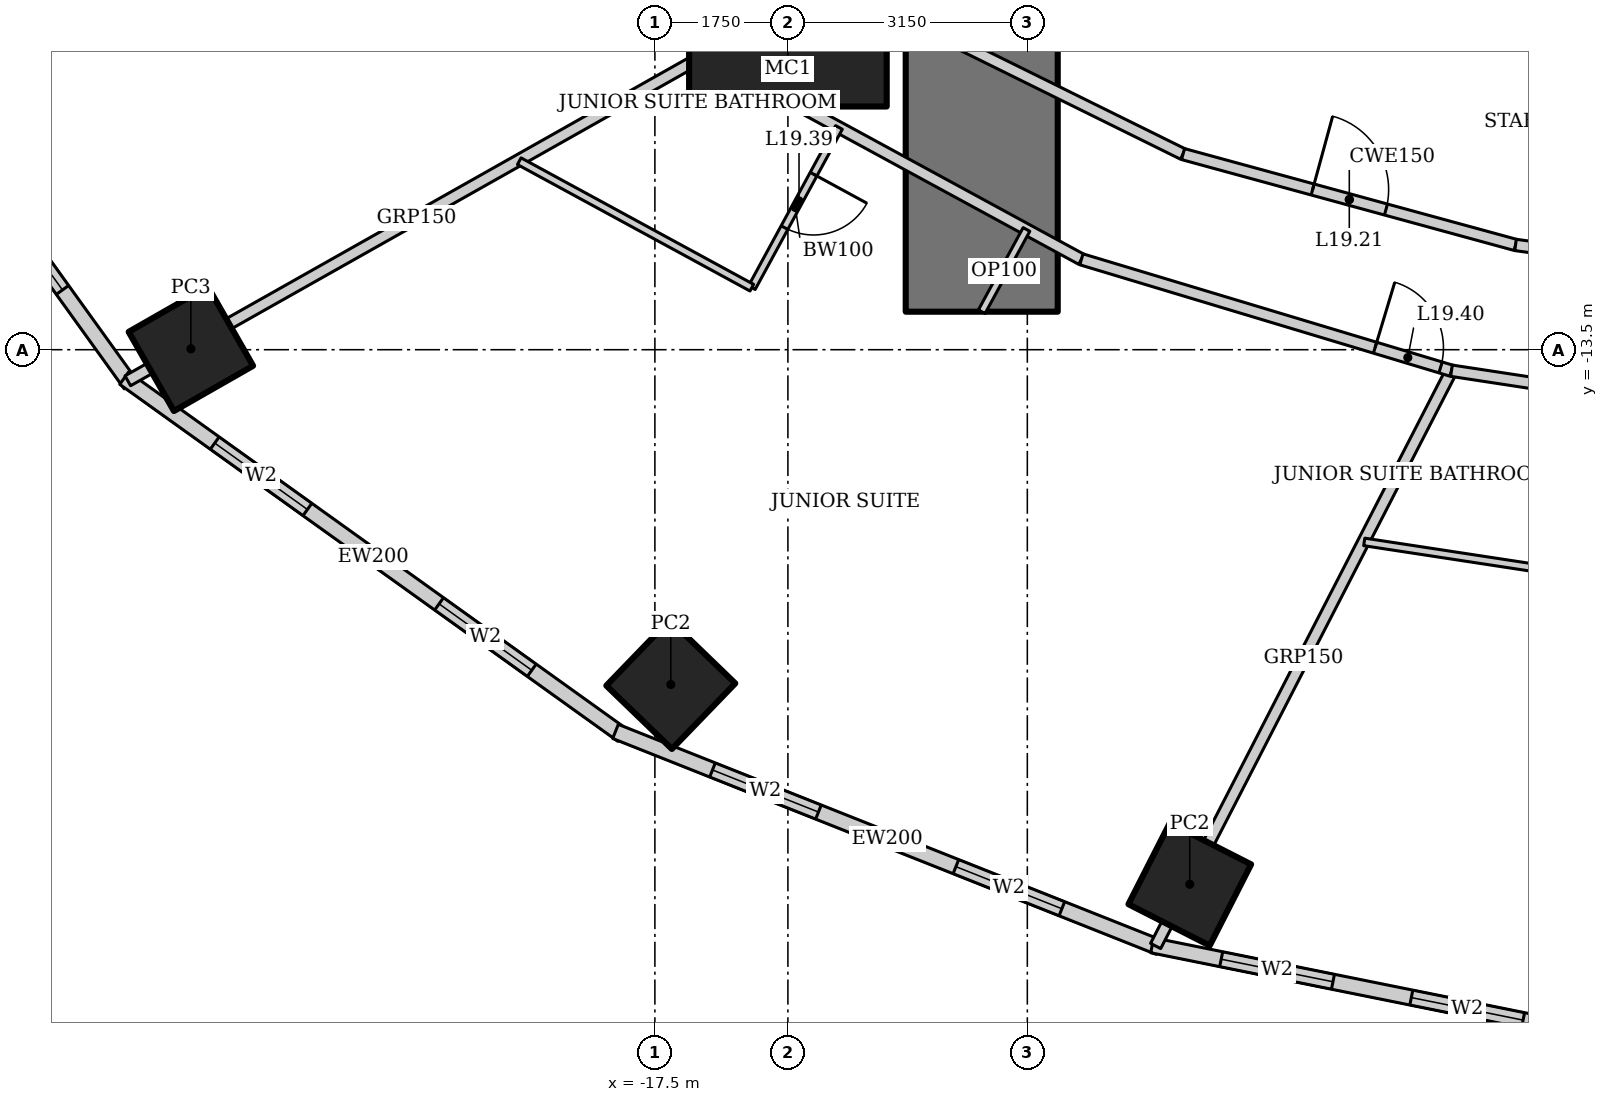
"""IFC4 building model, lengths in metres.
Left out: names, types, materials, properties, quantities, classifications, styles, units other than length and angle.
Written with IfcOpenShell. Run it as: python <this file> out.ifc"""

import sys

from ifc_helpers import new_model, si_unit, direction, frame, frame_2d, origin, origin_2d, place, context, subcontext, project, spatial, rectangle, hollow_rectangle, extrude, element, fill, save


model = new_model("IFC4")
c1 = context("Model", 3, precision=1e-05, world=origin(), true_north=direction((0.0, 1.0)))
c2 = subcontext(c1, "Body", "Model", "MODEL_VIEW")
j1 = project(units=[si_unit("LENGTHUNIT", "METRE"), si_unit("PLANEANGLEUNIT", "RADIAN")], contexts=[c1])
p1 = place(None, origin())
s1 = spatial("IfcSite", under=j1, at=p1, CompositionType="ELEMENT")
p2 = place(p1, origin())
s2 = spatial("IfcBuilding", under=s1, at=p2, CompositionType="ELEMENT")
p3 = place(p2, frame((0.0, 0.0, 83.8)))
s3 = spatial("IfcBuildingStorey", under=s2, at=p3, CompositionType="ELEMENT", Elevation=83.8)
p4 = place(p3, frame((-15.75, -9.0, 0.0), z_axis=(0.0, 0.0, 1.0), x_axis=(1.0, 0.0, 0.0)))
e1 = element("IfcColumn", 1, at=p4, inside=s3, PredefinedType="COLUMN", context=c2, shape_type="SweptSolid", body=[
    extrude(hollow_rectangle(XDim=2.6, YDim=2.6, WallThickness=0.13, at=origin_2d()), origin(), (0.0, 0.0, 1.0), 3.6),
])
p5 = place(p3, frame((-23.605, -13.489, 0.0), z_axis=(0.0, 0.0, 1.0), x_axis=(0.86824298017, 0.496139221777, 0.0)))
e2 = element("IfcColumn", 2, at=p5, inside=s3, PredefinedType="COLUMN", context=c2, shape_type="SweptSolid", body=[
    extrude(hollow_rectangle(XDim=1.2, YDim=1.2, WallThickness=0.12, at=origin_2d()), origin(), (0.0, 0.0, 1.0), 3.6),
])
for number, where, z_axis, x_axis in (
    (3, (-17.291, -17.905, 0.0), (0.0, 0.0, 1.0), (0.695, 0.719, 0.0)),
    (4, (-10.463, -20.534, 0.0), (0.0, 0.0, 1.0), (0.454, 0.891, 0.0)),
):
    element("IfcColumn", number, at=place(p3, frame(where, z_axis=z_axis, x_axis=x_axis)), inside=s3, PredefinedType="COLUMN", context=c2, shape_type="SweptSolid", body=[
        extrude(hollow_rectangle(XDim=1.2, YDim=1.2, WallThickness=0.1, at=origin_2d()), origin(), (0.0, 0.0, 1.0), 3.6),
    ])
p6 = place(p3, frame((-13.2, 13.0, 0.0), z_axis=(0.0, 0.0, 1.0), x_axis=(0.0, -1.0, 0.0)))
e5 = element("IfcWall", 5, at=p6, inside=s3, PredefinedType="SHEAR", context=c2, shape_type="SweptSolid", body=[
    extrude(rectangle(XDim=26.0, YDim=2.0, at=frame_2d((13.0, 0.0))), origin(), (0.0, 0.0, 1.0), 3.6),
])
p7 = place(p6, frame((12.1, 0.0, 0.0)))
e6 = element("IfcOpeningElement", 6, at=p7, cuts=e5, PredefinedType="OPENING", context=c2, shape_type="SweptSolid", body=[
    extrude(rectangle(XDim=1.8, YDim=2.1, at=frame_2d((0.9, 1.05))), frame((0.0, 1.01, 0.0), z_axis=(0.0, -1.0, 0.0), x_axis=(1.0, 0.0, 0.0)), (0.0, 0.0, 1.0), 2.02),
])
p8 = place(p3, frame((-29.26, -7.2, 0.0), z_axis=(0.0, 0.0, 1.0), x_axis=(0.583937613703, -0.811798536155, 0.0)))
e7 = element("IfcWall", 7, at=p8, inside=s3, PredefinedType="SOLIDWALL", context=c2, shape_type="SweptSolid", body=[
    extrude(rectangle(XDim=8.323, YDim=0.2, at=frame_2d((4.162, 0.0))), origin(), (0.0, 0.0, 1.0), 3.45),
])
p9 = place(p8, frame((1.531, 0.0, 0.5)))
e8 = element("IfcOpeningElement", 8, at=p9, cuts=e7, PredefinedType="OPENING", context=c2, shape_type="SweptSolid", body=[
    extrude(rectangle(XDim=1.5, YDim=2.2, at=frame_2d((0.75, 1.1))), frame((0.0, 0.11, 0.0), z_axis=(0.0, -1.0, 0.0), x_axis=(1.0, 0.0, 0.0)), (0.0, 0.0, 1.0), 0.22),
])
p10 = place(p8, frame((5.292, 0.0, 0.5)))
e9 = element("IfcOpeningElement", 9, at=p10, cuts=e7, PredefinedType="OPENING", context=c2, shape_type="SweptSolid", body=[
    extrude(rectangle(XDim=1.5, YDim=2.2, at=frame_2d((0.75, 1.1))), frame((0.0, 0.11, 0.0), z_axis=(0.0, -1.0, 0.0), x_axis=(1.0, 0.0, 0.0)), (0.0, 0.0, 1.0), 0.22),
])
p11 = place(p3, frame((-24.482, -13.875, 0.0), z_axis=(0.0, 0.0, 1.0), x_axis=(0.812791321576, -0.582554948112, 0.0)))
e10 = element("IfcWall", 10, at=p11, inside=s3, PredefinedType="SOLIDWALL", context=c2, shape_type="SweptSolid", body=[
    extrude(rectangle(XDim=8.063, YDim=0.2, at=frame_2d((4.032, 0.0))), origin(), (0.0, 0.0, 1.0), 3.45),
])
p12 = place(p11, frame((1.466, 0.0, 0.5)))
e11 = element("IfcOpeningElement", 11, at=p12, cuts=e10, PredefinedType="OPENING", context=c2, shape_type="SweptSolid", body=[
    extrude(rectangle(XDim=1.5, YDim=2.2, at=frame_2d((0.75, 1.1))), frame((0.0, 0.11, 0.0), z_axis=(0.0, -1.0, 0.0), x_axis=(1.0, 0.0, 0.0)), (0.0, 0.0, 1.0), 0.22),
])
p13 = place(p11, frame((5.097, 0.0, 0.5)))
e12 = element("IfcOpeningElement", 12, at=p13, cuts=e10, PredefinedType="OPENING", context=c2, shape_type="SweptSolid", body=[
    extrude(rectangle(XDim=1.5, YDim=2.2, at=frame_2d((0.75, 1.1))), frame((0.0, 0.11, 0.0), z_axis=(0.0, -1.0, 0.0), x_axis=(1.0, 0.0, 0.0)), (0.0, 0.0, 1.0), 0.22),
])
p14 = place(p3, frame((-18.018, -18.523, 0.0), z_axis=(0.0, 0.0, 1.0), x_axis=(0.929358351251, -0.369178892895, 0.0)))
e13 = element("IfcWall", 13, at=p14, inside=s3, PredefinedType="SOLIDWALL", context=c2, shape_type="SweptSolid", body=[
    extrude(rectangle(XDim=7.692, YDim=0.2, at=frame_2d((3.846, 0.0))), origin(), (0.0, 0.0, 1.0), 3.45),
])
p15 = place(p14, frame((1.373, 0.0, 0.5)))
e14 = element("IfcOpeningElement", 14, at=p15, cuts=e13, PredefinedType="OPENING", context=c2, shape_type="SweptSolid", body=[
    extrude(rectangle(XDim=1.5, YDim=2.2, at=frame_2d((0.75, 1.1))), frame((0.0, 0.11, 0.0), z_axis=(0.0, -1.0, 0.0), x_axis=(1.0, 0.0, 0.0)), (0.0, 0.0, 1.0), 0.22),
])
p16 = place(p14, frame((4.819, 0.0, 0.5)))
e15 = element("IfcOpeningElement", 15, at=p16, cuts=e13, PredefinedType="OPENING", context=c2, shape_type="SweptSolid", body=[
    extrude(rectangle(XDim=1.5, YDim=2.2, at=frame_2d((0.75, 1.1))), frame((0.0, 0.11, 0.0), z_axis=(0.0, -1.0, 0.0), x_axis=(1.0, 0.0, 0.0)), (0.0, 0.0, 1.0), 0.22),
])
p17 = place(p3, frame((-10.957, -21.337, 0.0), z_axis=(0.0, 0.0, 1.0), x_axis=(0.980251657452, -0.197754110105, 0.0)))
e16 = element("IfcWall", 16, at=p17, inside=s3, PredefinedType="SOLIDWALL", context=c2, shape_type="SweptSolid", body=[
    extrude(rectangle(XDim=5.904, YDim=0.2, at=frame_2d((2.952, 0.0))), origin(), (0.0, 0.0, 1.0), 3.45),
])
p18 = place(p17, frame((0.926, 0.0, 0.5)))
e17 = element("IfcOpeningElement", 17, at=p18, cuts=e16, PredefinedType="OPENING", context=c2, shape_type="SweptSolid", body=[
    extrude(rectangle(XDim=1.5, YDim=2.2, at=frame_2d((0.75, 1.1))), frame((0.0, 0.11, 0.0), z_axis=(0.0, -1.0, 0.0), x_axis=(1.0, 0.0, 0.0)), (0.0, 0.0, 1.0), 0.22),
])
p19 = place(p17, frame((3.478, 0.0, 0.5)))
e18 = element("IfcOpeningElement", 18, at=p19, cuts=e16, PredefinedType="OPENING", context=c2, shape_type="SweptSolid", body=[
    extrude(rectangle(XDim=1.5, YDim=2.2, at=frame_2d((0.75, 1.1))), frame((0.0, 0.11, 0.0), z_axis=(0.0, -1.0, 0.0), x_axis=(1.0, 0.0, 0.0)), (0.0, 0.0, 1.0), 0.22),
])
p20 = place(p3, frame((-24.435, -13.909, 0.0), z_axis=(0.0, 0.0, 1.0), x_axis=(0.87090601027, 0.491449612143, 0.0)))
e19 = element("IfcWall", 19, at=p20, inside=s3, PredefinedType="PARTITIONING", context=c2, shape_type="SweptSolid", body=[
    extrude(rectangle(XDim=8.726, YDim=0.15, at=frame_2d((4.363, 0.0))), origin(), (0.0, 0.0, 1.0), 2.693),
])
p21 = place(p3, frame((-10.912, -21.346, 0.0), z_axis=(0.0, 0.0, 1.0), x_axis=(0.457327273085, 0.889298468059, 0.0)))
e20 = element("IfcWall", 20, at=p21, inside=s3, PredefinedType="PARTITIONING", context=c2, shape_type="SweptSolid", body=[
    extrude(rectangle(XDim=8.511, YDim=0.15, at=frame_2d((4.256, 0.0))), origin(), (0.0, 0.0, 1.0), 2.528),
])
p22 = place(p3, frame((-20.984, -5.232, 0.0), z_axis=(0.0, 0.0, 1.0), x_axis=(0.687062608696, -0.726598218916, 0.0)))
e21 = element("IfcWall", 21, at=p22, inside=s3, PredefinedType="PARTITIONING", context=c2, shape_type="SweptSolid", body=[
    extrude(rectangle(XDim=6.039, YDim=0.15, at=frame_2d((3.02, 0.0))), origin(), (0.0, 0.0, 1.0), 3.45),
])
p23 = place(p22, frame((0.15, 0.0, 0.0)))
e22 = element("IfcOpeningElement", 22, at=p23, cuts=e21, PredefinedType="OPENING", context=c2, shape_type="SweptSolid", body=[
    extrude(rectangle(XDim=0.9, YDim=2.1, at=frame_2d((0.45, 1.05))), frame((0.0, 0.085, 0.0), z_axis=(0.0, -1.0, 0.0), x_axis=(1.0, 0.0, 0.0)), (0.0, 0.0, 1.0), 0.17),
])
p24 = place(p3, frame((-16.835, -9.62, 0.0), z_axis=(0.0, 0.0, 1.0), x_axis=(0.878450059298, -0.477834169267, 0.0)))
e23 = element("IfcWall", 23, at=p24, inside=s3, PredefinedType="PARTITIONING", context=c2, shape_type="SweptSolid", body=[
    extrude(rectangle(XDim=5.631, YDim=0.15, at=frame_2d((2.815, 0.0))), origin(), (0.0, 0.0, 1.0), 3.45),
])
p25 = place(p3, frame((-11.888, -12.311, 0.0), z_axis=(0.0, 0.0, 1.0), x_axis=(0.957564241242, -0.288219922793, 0.0)))
e24 = element("IfcWall", 24, at=p25, inside=s3, PredefinedType="PARTITIONING", context=c2, shape_type="SweptSolid", body=[
    extrude(rectangle(XDim=5.085, YDim=0.15, at=frame_2d((2.542, 0.0))), origin(), (0.0, 0.0, 1.0), 3.45),
])
p26 = place(p25, frame((4.035, 0.0, 0.0)))
e25 = element("IfcOpeningElement", 25, at=p26, cuts=e24, PredefinedType="OPENING", context=c2, shape_type="SweptSolid", body=[
    extrude(rectangle(XDim=0.9, YDim=2.1, at=frame_2d((0.45, 1.05))), frame((0.0, 0.085, 0.0), z_axis=(0.0, -1.0, 0.0), x_axis=(1.0, 0.0, 0.0)), (0.0, 0.0, 1.0), 0.17),
])
p27 = place(p3, frame((-7.019, -13.776, 0.0), z_axis=(0.0, 0.0, 1.0), x_axis=(0.988564270062, -0.150800145746, 0.0)))
e26 = element("IfcWall", 26, at=p27, inside=s3, PredefinedType="PARTITIONING", context=c2, shape_type="SweptSolid", body=[
    extrude(rectangle(XDim=3.751, YDim=0.15, at=frame_2d((1.875, 0.0))), origin(), (0.0, 0.0, 1.0), 3.45),
])
p28 = place(p3, frame((-15.147, -8.656, 0.0), z_axis=(0.0, 0.0, 1.0), x_axis=(0.89656943448, -0.442903205177, 0.0)))
e27 = element("IfcWall", 27, at=p28, inside=s3, PredefinedType="PARTITIONING", context=c2, shape_type="SweptSolid", body=[
    extrude(rectangle(XDim=5.126, YDim=0.15, at=frame_2d((2.563, 0.0))), origin(), (0.0, 0.0, 1.0), 3.45),
])
p29 = place(p3, frame((-10.551, -10.926, 0.0), z_axis=(0.0, 0.0, 1.0), x_axis=(0.964644466646, -0.263554648923, 0.0)))
e28 = element("IfcWall", 28, at=p29, inside=s3, PredefinedType="PARTITIONING", context=c2, shape_type="SweptSolid", body=[
    extrude(rectangle(XDim=4.535, YDim=0.15, at=frame_2d((2.268, 0.0))), origin(), (0.0, 0.0, 1.0), 3.45),
])
p30 = place(p29, frame((1.768, 0.0, 0.0)))
e29 = element("IfcOpeningElement", 29, at=p30, cuts=e28, PredefinedType="OPENING", context=c2, shape_type="SweptSolid", body=[
    extrude(rectangle(XDim=1.0, YDim=2.1, at=frame_2d((0.5, 1.05))), frame((0.0, 0.085, 0.0), z_axis=(0.0, -1.0, 0.0), x_axis=(1.0, 0.0, 0.0)), (0.0, 0.0, 1.0), 0.17),
])
p31 = place(p3, frame((-6.176, -12.122, 0.0), z_axis=(0.0, 0.0, 1.0), x_axis=(0.990563451353, -0.137054911782, 0.0)))
e30 = element("IfcWall", 30, at=p31, inside=s3, PredefinedType="PARTITIONING", context=c2, shape_type="SweptSolid", body=[
    extrude(rectangle(XDim=3.304, YDim=0.15, at=frame_2d((1.652, 0.0))), origin(), (0.0, 0.0, 1.0), 3.45),
])
p32 = place(p3, frame((-15.078, -10.576, 0.0), z_axis=(0.0, 0.0, 1.0), x_axis=(-0.477832549678, -0.878450940274, 0.0)))
e31 = element("IfcWall", 31, at=p32, inside=s3, PredefinedType="PARTITIONING", context=c2, shape_type="SweptSolid", body=[
    extrude(rectangle(XDim=2.4, YDim=0.1, at=frame_2d((1.2, 0.0))), origin(), (0.0, 0.0, 1.0), 3.45),
])
p33 = place(p32, frame((0.7, 0.0, 0.0)))
e32 = element("IfcOpeningElement", 32, at=p33, cuts=e31, PredefinedType="OPENING", context=c2, shape_type="SweptSolid", body=[
    extrude(rectangle(XDim=0.8, YDim=2.1, at=frame_2d((0.4, 1.05))), frame((0.0, 0.06, 0.0), z_axis=(0.0, -1.0, 0.0), x_axis=(1.0, 0.0, 0.0)), (0.0, 0.0, 1.0), 0.12),
])
p34 = place(p3, frame((-16.225, -12.684, 0.0), z_axis=(0.0, 0.0, 1.0), x_axis=(-0.878473578893, 0.477790928322, 0.0)))
e33 = element("IfcWall", 33, at=p34, inside=s3, PredefinedType="PARTITIONING", context=c2, shape_type="SweptSolid", body=[
    extrude(rectangle(XDim=3.483, YDim=0.1, at=frame_2d((1.741, 0.0))), origin(), (0.0, 0.0, 1.0), 3.45),
])
p35 = place(p3, frame((-5.404, -16.45, 0.0), z_axis=(0.0, 0.0, 1.0), x_axis=(-0.988568792086, 0.150770498819, 0.0)))
e34 = element("IfcWall", 34, at=p35, inside=s3, PredefinedType="PARTITIONING", context=c2, shape_type="SweptSolid", body=[
    extrude(rectangle(XDim=2.795, YDim=0.1, at=frame_2d((1.397, 0.0))), origin(), (0.0, 0.0, 1.0), 3.45),
])
p36 = place(p3, frame((-13.2, -13.0, 0.0), z_axis=(0.0, 0.0, 1.0), x_axis=(0.477852414256, 0.878440134665, 0.0)))
e35 = element("IfcWall", 35, at=p36, inside=s3, PredefinedType="PARTITIONING", context=c2, shape_type="SweptSolid", body=[
    extrude(rectangle(XDim=1.232, YDim=0.1, at=frame_2d((0.616, 0.0))), origin(), (0.0, 0.0, 1.0), 3.45),
])
p37 = place(p10, origin())
e36 = element("IfcWindow", 36, at=p37, inside=s3, PartitioningType="SINGLE_PANEL", PredefinedType="WINDOW", context=c2, shape_type="SweptSolid", body=[
    extrude(rectangle(XDim=1.5, YDim=2.2, at=frame_2d((0.75, 1.1))), frame((0.0, 0.03, 0.0), z_axis=(0.0, -1.0, 0.0), x_axis=(1.0, 0.0, 0.0)), (0.0, 0.0, 1.0), 0.06),
])
fill(e9, e36)
p38 = place(p12, origin())
e37 = element("IfcWindow", 37, at=p38, inside=s3, PartitioningType="SINGLE_PANEL", PredefinedType="WINDOW", context=c2, shape_type="SweptSolid", body=[
    extrude(rectangle(XDim=1.5, YDim=2.2, at=frame_2d((0.75, 1.1))), frame((0.0, 0.03, 0.0), z_axis=(0.0, -1.0, 0.0), x_axis=(1.0, 0.0, 0.0)), (0.0, 0.0, 1.0), 0.06),
])
fill(e11, e37)
p39 = place(p13, origin())
e38 = element("IfcWindow", 38, at=p39, inside=s3, PartitioningType="SINGLE_PANEL", PredefinedType="WINDOW", context=c2, shape_type="SweptSolid", body=[
    extrude(rectangle(XDim=1.5, YDim=2.2, at=frame_2d((0.75, 1.1))), frame((0.0, 0.03, 0.0), z_axis=(0.0, -1.0, 0.0), x_axis=(1.0, 0.0, 0.0)), (0.0, 0.0, 1.0), 0.06),
])
fill(e12, e38)
p40 = place(p15, origin())
e39 = element("IfcWindow", 39, at=p40, inside=s3, PartitioningType="SINGLE_PANEL", PredefinedType="WINDOW", context=c2, shape_type="SweptSolid", body=[
    extrude(rectangle(XDim=1.5, YDim=2.2, at=frame_2d((0.75, 1.1))), frame((0.0, 0.03, 0.0), z_axis=(0.0, -1.0, 0.0), x_axis=(1.0, 0.0, 0.0)), (0.0, 0.0, 1.0), 0.06),
])
fill(e14, e39)
p41 = place(p16, origin())
e40 = element("IfcWindow", 40, at=p41, inside=s3, PartitioningType="SINGLE_PANEL", PredefinedType="WINDOW", context=c2, shape_type="SweptSolid", body=[
    extrude(rectangle(XDim=1.5, YDim=2.2, at=frame_2d((0.75, 1.1))), frame((0.0, 0.03, 0.0), z_axis=(0.0, -1.0, 0.0), x_axis=(1.0, 0.0, 0.0)), (0.0, 0.0, 1.0), 0.06),
])
fill(e15, e40)
p42 = place(p18, origin())
e41 = element("IfcWindow", 41, at=p42, inside=s3, PartitioningType="SINGLE_PANEL", PredefinedType="WINDOW", context=c2, shape_type="SweptSolid", body=[
    extrude(rectangle(XDim=1.5, YDim=2.2, at=frame_2d((0.75, 1.1))), frame((0.0, 0.03, 0.0), z_axis=(0.0, -1.0, 0.0), x_axis=(1.0, 0.0, 0.0)), (0.0, 0.0, 1.0), 0.06),
])
fill(e17, e41)
p43 = place(p19, origin())
e42 = element("IfcWindow", 42, at=p43, inside=s3, PartitioningType="SINGLE_PANEL", PredefinedType="WINDOW", context=c2, shape_type="SweptSolid", body=[
    extrude(rectangle(XDim=1.5, YDim=2.2, at=frame_2d((0.75, 1.1))), frame((0.0, 0.03, 0.0), z_axis=(0.0, -1.0, 0.0), x_axis=(1.0, 0.0, 0.0)), (0.0, 0.0, 1.0), 0.06),
])
fill(e18, e42)
p44 = place(p30, origin())
e43 = element("IfcDoor", 43, at=p44, inside=s3, OperationType="SINGLE_SWING_LEFT", PredefinedType="DOOR", context=c2, shape_type="SweptSolid", body=[
    extrude(rectangle(XDim=1.0, YDim=2.1, at=frame_2d((0.5, 1.05))), frame((0.0, 0.025, 0.0), z_axis=(0.0, -1.0, 0.0), x_axis=(1.0, 0.0, 0.0)), (0.0, 0.0, 1.0), 0.05),
])
fill(e29, e43)
p45 = place(p33, origin())
e44 = element("IfcDoor", 44, at=p45, inside=s3, OperationType="SINGLE_SWING_LEFT", PredefinedType="DOOR", context=c2, shape_type="SweptSolid", body=[
    extrude(rectangle(XDim=0.8, YDim=2.1, at=frame_2d((0.4, 1.05))), frame((0.0, 0.025, 0.0), z_axis=(0.0, -1.0, 0.0), x_axis=(1.0, 0.0, 0.0)), (0.0, 0.0, 1.0), 0.05),
])
fill(e32, e44)
p46 = place(p26, origin())
e45 = element("IfcDoor", 45, at=p46, inside=s3, OperationType="SINGLE_SWING_LEFT", PredefinedType="DOOR", context=c2, shape_type="SweptSolid", body=[
    extrude(rectangle(XDim=0.9, YDim=2.1, at=frame_2d((0.45, 1.05))), frame((0.0, 0.025, 0.0), z_axis=(0.0, -1.0, 0.0), x_axis=(1.0, 0.0, 0.0)), (0.0, 0.0, 1.0), 0.05),
])
fill(e25, e45)
save(model, sys.argv[1])
